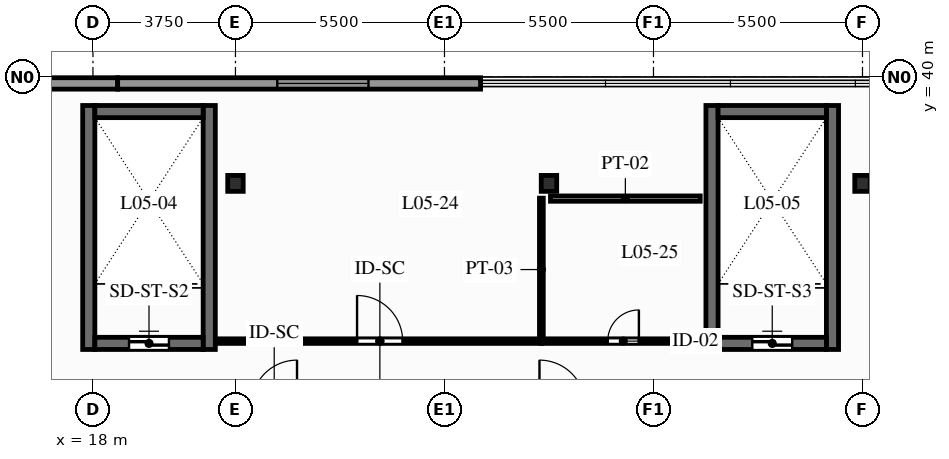
"""IFC4 building model, lengths in metres.
Left out: names, types, materials, properties, quantities, classifications, styles, units other than length and angle.
Written with IfcOpenShell. Run it as: python <this file> out.ifc"""

import sys

from ifc_helpers import new_model, si_unit, direction, frame, frame_2d, origin, origin_2d, place, context, subcontext, project, spatial, rectangle, i_section, extrude, element, fill, save


model = new_model("IFC4")
c1 = context("Model", 3, precision=1e-05, world=origin(), true_north=direction((0.0, 1.0)))
c2 = subcontext(c1, "Body", "Model", "MODEL_VIEW")
j1 = project(units=[si_unit("LENGTHUNIT", "METRE"), si_unit("PLANEANGLEUNIT", "RADIAN")], contexts=[c1])
p1 = place(None, origin())
s1 = spatial("IfcSite", under=j1, at=p1, CompositionType="ELEMENT")
p2 = place(p1, origin())
s2 = spatial("IfcBuilding", under=s1, at=p2, CompositionType="ELEMENT")
p3 = place(p2, frame((0.0, 0.0, 22.5)))
s3 = spatial("IfcBuildingStorey", under=s2, at=p3, CompositionType="ELEMENT", Elevation=22.5)
for number, where, z_axis, x_axis in (
    (1, (21.75, 37.2, 0.0), (0.0, 0.0, 1.0), (1.0, 0.0, 0.0)),
    (2, (30.0, 37.2, 0.0), (0.0, 0.0, 1.0), (1.0, 0.0, 0.0)),
    (3, (38.25, 37.2, 0.0), (0.0, 0.0, 1.0), (1.0, 0.0, 0.0)),
):
    element("IfcColumn", number, at=place(p3, frame(where, z_axis=z_axis, x_axis=x_axis)), inside=s3, PredefinedType="COLUMN", context=c2, shape_type="SweptSolid", body=[
        extrude(i_section(OverallWidth=0.407, OverallDepth=0.419, WebThickness=0.031, FlangeThickness=0.049, FilletRadius=0.015, at=origin_2d()), origin(), (0.0, 0.0, 1.0), 5.5),
    ])
p4 = place(p3, frame((7.1, 39.83, 0.0), z_axis=(0.0, 0.0, 1.0), x_axis=(1.0, 0.0, 0.0)))
e4 = element("IfcWall", 4, at=p4, inside=s3, PredefinedType="STANDARD", context=c2, shape_type="SweptSolid", body=[
    extrude(rectangle(XDim=11.55, YDim=0.3, at=frame_2d((5.775, 0.0))), origin(), (0.0, 0.0, 1.0), 5.23),
])
p5 = place(p3, frame((18.65, 39.83, 0.0), z_axis=(0.0, 0.0, 1.0), x_axis=(1.0, 0.0, 0.0)))
e5 = element("IfcWall", 5, at=p5, inside=s3, PredefinedType="STANDARD", context=c2, shape_type="SweptSolid", body=[
    extrude(rectangle(XDim=9.55, YDim=0.3, at=frame_2d((4.775, 0.0))), origin(), (0.0, 0.0, 1.0), 5.23),
])
p6 = place(p5, frame((4.2, 0.0, 0.9)))
e6 = element("IfcOpeningElement", 6, at=p6, cuts=e5, PredefinedType="OPENING", context=c2, shape_type="SweptSolid", body=[
    extrude(rectangle(XDim=2.4, YDim=2.15, at=frame_2d((1.2, 1.075))), frame((0.0, 0.16, 0.0), z_axis=(0.0, -1.0, 0.0), x_axis=(1.0, 0.0, 0.0)), (0.0, 0.0, 1.0), 0.32),
])
for number, where, z_axis, x_axis in (
    (7, (17.89, 32.83, 0.0), (0.0, 0.0, 1.0), (0.0, 1.0, 0.0)),
    (8, (21.06, 32.83, 0.0), (0.0, 0.0, 1.0), (0.0, 1.0, 0.0)),
):
    element("IfcWall", number, at=place(p3, frame(where, z_axis=z_axis, x_axis=x_axis)), inside=s3, PredefinedType="SHEAR", context=c2, shape_type="SweptSolid", body=[
        extrude(rectangle(XDim=6.42, YDim=0.32, at=frame_2d((3.21, 0.0))), origin(), (0.0, 0.0, 1.0), 5.23),
    ])
p7 = place(p3, frame((18.05, 32.99, 0.0), z_axis=(0.0, 0.0, 1.0), x_axis=(1.0, 0.0, 0.0)))
e9 = element("IfcWall", 9, at=p7, inside=s3, PredefinedType="SHEAR", context=c2, shape_type="SweptSolid", body=[
    extrude(rectangle(XDim=2.85, YDim=0.32, at=frame_2d((1.425, 0.0))), origin(), (0.0, 0.0, 1.0), 5.23),
])
p8 = place(p7, frame((0.9, 0.0, 0.0)))
e10 = element("IfcOpeningElement", 10, at=p8, cuts=e9, PredefinedType="OPENING", context=c2, shape_type="SweptSolid", body=[
    extrude(rectangle(XDim=1.05, YDim=2.06, at=frame_2d((0.525, 1.03))), frame((0.0, 0.17, 0.0), z_axis=(0.0, -1.0, 0.0), x_axis=(1.0, 0.0, 0.0)), (0.0, 0.0, 1.0), 0.34),
])
p9 = place(p3, frame((20.9, 39.09, 0.0), z_axis=(0.0, 0.0, 1.0), x_axis=(-1.0, 0.0, 0.0)))
e11 = element("IfcWall", 11, at=p9, inside=s3, PredefinedType="SHEAR", context=c2, shape_type="SweptSolid", body=[
    extrude(rectangle(XDim=2.85, YDim=0.32, at=frame_2d((1.425, 0.0))), origin(), (0.0, 0.0, 1.0), 5.23),
])
for number, where, z_axis, x_axis in (
    (12, (34.29, 32.83, 0.0), (0.0, 0.0, 1.0), (0.0, 1.0, 0.0)),
    (13, (37.46, 32.83, 0.0), (0.0, 0.0, 1.0), (0.0, 1.0, 0.0)),
):
    element("IfcWall", number, at=place(p3, frame(where, z_axis=z_axis, x_axis=x_axis)), inside=s3, PredefinedType="SHEAR", context=c2, shape_type="SweptSolid", body=[
        extrude(rectangle(XDim=6.42, YDim=0.32, at=frame_2d((3.21, 0.0))), origin(), (0.0, 0.0, 1.0), 5.23),
    ])
p10 = place(p3, frame((34.45, 32.99, 0.0), z_axis=(0.0, 0.0, 1.0), x_axis=(1.0, 0.0, 0.0)))
e14 = element("IfcWall", 14, at=p10, inside=s3, PredefinedType="SHEAR", context=c2, shape_type="SweptSolid", body=[
    extrude(rectangle(XDim=2.85, YDim=0.32, at=frame_2d((1.425, 0.0))), origin(), (0.0, 0.0, 1.0), 5.23),
])
p11 = place(p10, frame((0.9, 0.0, 0.0)))
e15 = element("IfcOpeningElement", 15, at=p11, cuts=e14, PredefinedType="OPENING", context=c2, shape_type="SweptSolid", body=[
    extrude(rectangle(XDim=1.05, YDim=2.06, at=frame_2d((0.525, 1.03))), frame((0.0, 0.17, 0.0), z_axis=(0.0, -1.0, 0.0), x_axis=(1.0, 0.0, 0.0)), (0.0, 0.0, 1.0), 0.34),
])
p12 = place(p3, frame((37.3, 39.09, 0.0), z_axis=(0.0, 0.0, 1.0), x_axis=(-1.0, 0.0, 0.0)))
e16 = element("IfcWall", 16, at=p12, inside=s3, PredefinedType="SHEAR", context=c2, shape_type="SweptSolid", body=[
    extrude(rectangle(XDim=2.85, YDim=0.32, at=frame_2d((1.425, 0.0))), origin(), (0.0, 0.0, 1.0), 5.23),
])
p13 = place(p3, frame((21.289, 33.05, 0.0), z_axis=(0.0, 0.0, 1.0), x_axis=(1.0, 0.0, 0.0)))
e17 = element("IfcWall", 17, at=p13, inside=s3, PredefinedType="PARTITIONING", context=c2, shape_type="SweptSolid", body=[
    extrude(rectangle(XDim=8.522, YDim=0.12, at=frame_2d((4.261, 0.0))), origin(), (0.0, 0.0, 1.0), 4.585),
])
p14 = place(p13, frame((3.661, 0.0, 0.0)))
e18 = element("IfcOpeningElement", 18, at=p14, cuts=e17, PredefinedType="OPENING", context=c2, shape_type="SweptSolid", body=[
    extrude(rectangle(XDim=1.2, YDim=2.08, at=frame_2d((0.6, 1.04))), frame((0.0, 0.07, 0.0), z_axis=(0.0, -1.0, 0.0), x_axis=(1.0, 0.0, 0.0)), (0.0, 0.0, 1.0), 0.14),
])
p15 = place(p3, frame((29.793, 33.05, 0.0), z_axis=(0.0, 0.0, 1.0), x_axis=(1.0, 0.0, 0.0)))
e19 = element("IfcWall", 19, at=p15, inside=s3, PredefinedType="PARTITIONING", context=c2, shape_type="SweptSolid", body=[
    extrude(rectangle(XDim=4.327, YDim=0.12, at=frame_2d((2.164, 0.0))), origin(), (0.0, 0.0, 1.0), 5.23),
])
p16 = place(p15, frame((1.754, 0.0, 0.0)))
e20 = element("IfcOpeningElement", 20, at=p16, cuts=e19, PredefinedType="OPENING", context=c2, shape_type="SweptSolid", body=[
    extrude(rectangle(XDim=0.82, YDim=2.02, at=frame_2d((0.41, 1.01))), frame((0.0, 0.07, 0.0), z_axis=(0.0, -1.0, 0.0), x_axis=(1.0, 0.0, 0.0)), (0.0, 0.0, 1.0), 0.14),
])
p17 = place(p3, frame((29.8, 33.054, 0.0), z_axis=(0.0, 0.0, 1.0), x_axis=(0.0, 1.0, 0.0)))
e21 = element("IfcWall", 21, at=p17, inside=s3, PredefinedType="PARTITIONING", context=c2, shape_type="SweptSolid", body=[
    extrude(rectangle(XDim=3.757, YDim=0.1, at=frame_2d((1.879, 0.0))), origin(), (0.0, 0.0, 1.0), 5.23),
])
p18 = place(p3, frame((30.04, 36.8, 0.0), z_axis=(0.0, 0.0, 1.0), x_axis=(1.0, 0.0, 0.0)))
e22 = element("IfcWall", 22, at=p18, inside=s3, PredefinedType="PARTITIONING", context=c2, shape_type="SweptSolid", body=[
    extrude(rectangle(XDim=3.94, YDim=0.14, at=frame_2d((1.97, 0.0))), origin(), (0.0, 0.0, 1.0), 5.23),
])
p19 = place(p6, origin())
e23 = element("IfcWindow", 23, at=p19, inside=s3, PartitioningType="SINGLE_PANEL", PredefinedType="WINDOW", context=c2, shape_type="SweptSolid", body=[
    extrude(rectangle(XDim=2.4, YDim=2.15, at=frame_2d((1.2, 1.075))), frame((0.0, 0.03, 0.0), z_axis=(0.0, -1.0, 0.0), x_axis=(1.0, 0.0, 0.0)), (0.0, 0.0, 1.0), 0.06),
])
fill(e6, e23)
p20 = place(p8, origin())
e24 = element("IfcDoor", 24, at=p20, inside=s3, OperationType="SINGLE_SWING_RIGHT", PredefinedType="DOOR", context=c2, shape_type="SweptSolid", body=[
    extrude(rectangle(XDim=1.05, YDim=2.06, at=frame_2d((0.525, 1.03))), frame((0.0, 0.025, 0.0), z_axis=(0.0, -1.0, 0.0), x_axis=(1.0, 0.0, 0.0)), (0.0, 0.0, 1.0), 0.05),
])
fill(e10, e24)
p21 = place(p11, origin())
e25 = element("IfcDoor", 25, at=p21, inside=s3, OperationType="SINGLE_SWING_RIGHT", PredefinedType="DOOR", context=c2, shape_type="SweptSolid", body=[
    extrude(rectangle(XDim=1.05, YDim=2.06, at=frame_2d((0.525, 1.03))), frame((0.0, 0.025, 0.0), z_axis=(0.0, -1.0, 0.0), x_axis=(1.0, 0.0, 0.0)), (0.0, 0.0, 1.0), 0.05),
])
fill(e15, e25)
p22 = place(p14, origin())
e26 = element("IfcDoor", 26, at=p22, inside=s3, OperationType="SINGLE_SWING_LEFT", PredefinedType="DOOR", context=c2, shape_type="SweptSolid", body=[
    extrude(rectangle(XDim=1.2, YDim=2.08, at=frame_2d((0.6, 1.04))), frame((0.0, 0.025, 0.0), z_axis=(0.0, -1.0, 0.0), x_axis=(1.0, 0.0, 0.0)), (0.0, 0.0, 1.0), 0.05),
])
fill(e18, e26)
p23 = place(p16, origin())
e27 = element("IfcDoor", 27, at=p23, inside=s3, OperationType="SINGLE_SWING_RIGHT", PredefinedType="DOOR", context=c2, shape_type="SweptSolid", body=[
    extrude(rectangle(XDim=0.82, YDim=2.02, at=frame_2d((0.41, 1.01))), frame((0.0, 0.025, 0.0), z_axis=(0.0, -1.0, 0.0), x_axis=(1.0, 0.0, 0.0)), (0.0, 0.0, 1.0), 0.05),
])
fill(e20, e27)
save(model, sys.argv[1])
